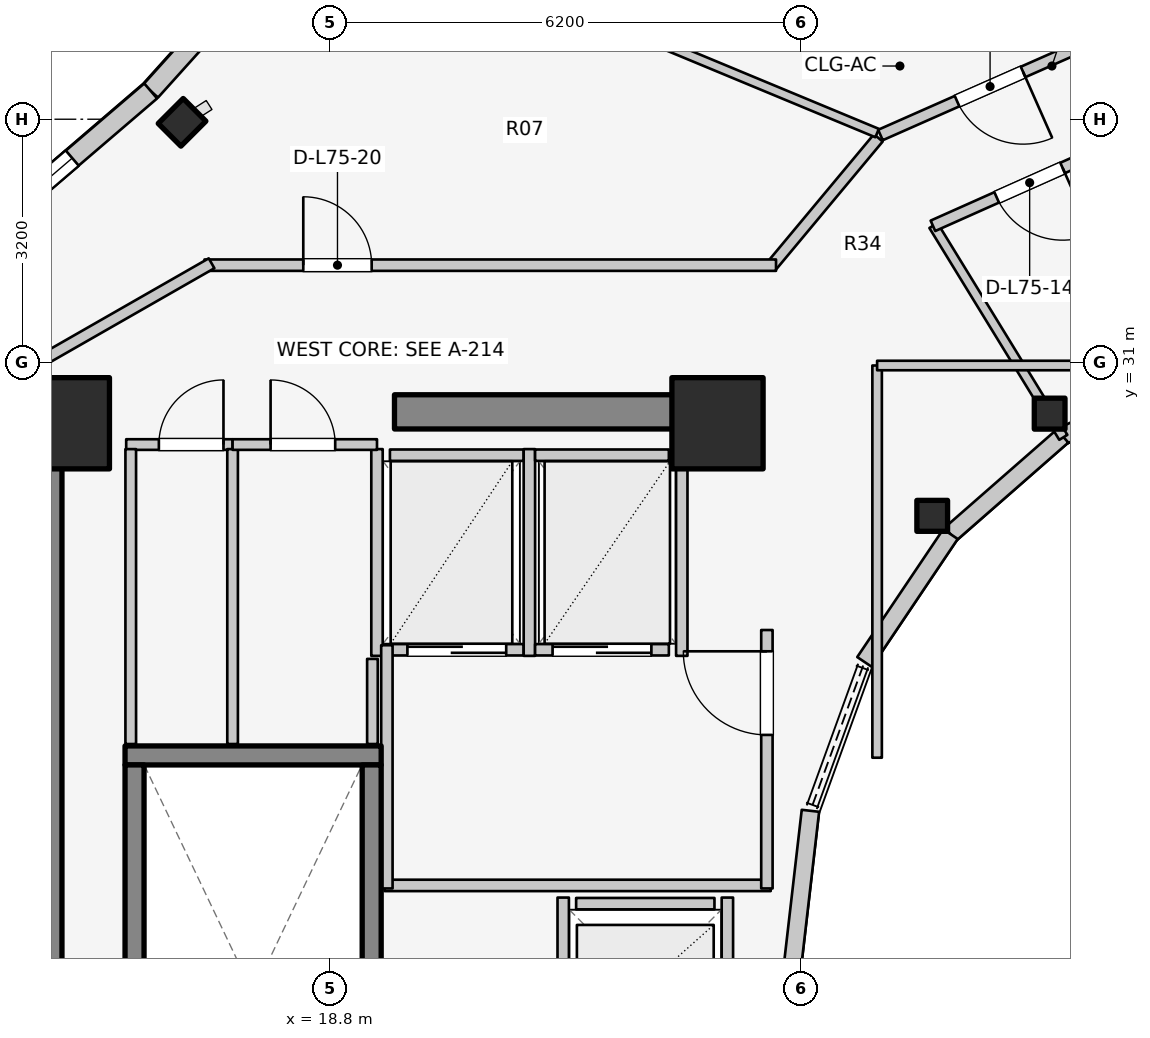
"""IFC4 building model, lengths in metres.
Left out: names, types, materials, properties, quantities, classifications, styles, units other than length and angle.
Written with IfcOpenShell. Run it as: python <this file> out.ifc"""

import sys

from ifc_helpers import new_model, si_unit, direction, frame, frame_2d, origin, origin_2d, place, context, subcontext, project, spatial, rectangle, i_section, extrude, element, fill, save


model = new_model("IFC4")
c1 = context("Model", 3, precision=1e-05, world=origin(), true_north=direction((0.0, 1.0)))
c2 = subcontext(c1, "Body", "Model", "MODEL_VIEW")
j1 = project(units=[si_unit("LENGTHUNIT", "METRE"), si_unit("PLANEANGLEUNIT", "RADIAN")], contexts=[c1])
p1 = place(None, origin())
s1 = spatial("IfcSite", under=j1, at=p1, CompositionType="ELEMENT")
p2 = place(p1, origin())
s2 = spatial("IfcBuilding", under=s1, at=p2, CompositionType="ELEMENT")
p3 = place(p2, frame((0.0, 0.0, 246.0)))
s3 = spatial("IfcBuildingStorey", under=s2, at=p3, CompositionType="ELEMENT", Elevation=246.0)
p4 = place(p3, frame((15.05, 17.05, 0.0), z_axis=(0.0, 0.0, 1.0), x_axis=(0.0, 1.0, 0.0)))
e1 = element("IfcWall", 1, at=p4, inside=s3, PredefinedType="SHEAR", context=c2, shape_type="SweptSolid", body=[
    extrude(rectangle(XDim=12.8, YDim=0.45, at=frame_2d((6.4, 0.0))), origin(), (0.0, 0.0, 1.0), 3.6),
])
p5 = place(p3, frame((19.65, 30.35, 0.0), z_axis=(0.0, 0.0, 1.0), x_axis=(1.0, 0.0, 0.0)))
e2 = element("IfcWall", 2, at=p5, inside=s3, PredefinedType="SHEAR", context=c2, shape_type="SweptSolid", body=[
    extrude(rectangle(XDim=4.5, YDim=0.45, at=frame_2d((2.25, 0.0))), origin(), (0.0, 0.0, 1.0), 3.6),
])
p6 = place(p3, frame((16.105, 25.83, 0.0), z_axis=(0.0, 0.0, 1.0), x_axis=(1.0, 0.0, 0.0)))
e3 = element("IfcWall", 3, at=p6, inside=s3, PredefinedType="SOLIDWALL", context=c2, shape_type="SweptSolid", body=[
    extrude(rectangle(XDim=3.37, YDim=0.25, at=frame_2d((1.685, 0.0))), origin(), (0.0, 0.0, 1.0), 3.6),
])
for number, where, z_axis, x_axis in (
    (4, (16.23, 17.895, 0.0), (0.0, 0.0, 1.0), (0.0, 1.0, 0.0)),
    (5, (19.35, 17.895, 0.0), (0.0, 0.0, 1.0), (0.0, 1.0, 0.0)),
):
    element("IfcWall", number, at=place(p3, frame(where, z_axis=z_axis, x_axis=x_axis)), inside=s3, PredefinedType="SOLIDWALL", context=c2, shape_type="SweptSolid", body=[
        extrude(rectangle(XDim=7.81, YDim=0.25, at=frame_2d((3.905, 0.0))), origin(), (0.0, 0.0, 1.0), 3.6),
    ])
for number, where, z_axis, x_axis in (
    (6, (23.9, 30.2, 0.0), (0.0, 0.0, 1.0), (1.0, 0.0, 0.0)),
    (7, (15.3, 30.2, 0.0), (0.0, 0.0, 1.0), (1.0, 0.0, 0.0)),
):
    element("IfcColumn", number, at=place(p3, frame(where, z_axis=z_axis, x_axis=x_axis)), inside=s3, PredefinedType="COLUMN", context=c2, shape_type="SweptSolid", body=[
        extrude(rectangle(XDim=1.2, YDim=1.2, at=origin_2d()), origin(), (0.0, 0.0, 1.0), 3.6),
    ])
for number, where, z_axis, x_axis in (
    (8, (28.27, 30.327, 0.0), (0.0, 0.0, 1.0), (1.0, 0.0, 0.0)),
    (9, (26.725, 28.982, 0.0), (0.0, 0.0, 1.0), (1.0, 0.0, 0.0)),
):
    element("IfcColumn", number, at=place(p3, frame(where, z_axis=z_axis, x_axis=x_axis)), inside=s3, PredefinedType="COLUMN", context=c2, shape_type="SweptSolid", body=[
        extrude(i_section(OverallWidth=0.404, OverallDepth=0.407, WebThickness=0.027, FlangeThickness=0.044, FilletRadius=0.025, at=origin_2d()), origin(), (0.0, 0.0, 1.0), 3.6),
    ])
p7 = place(p3, frame((16.855, 34.159, 0.0), z_axis=(0.0, 0.0, 1.0), x_axis=(-0.707106781187, 0.707106781187, 0.0)))
e10 = element("IfcColumn", 10, at=p7, inside=s3, PredefinedType="COLUMN", context=c2, shape_type="SweptSolid", body=[
    extrude(i_section(OverallWidth=0.422, OverallDepth=0.465, WebThickness=0.045, FlangeThickness=0.073, FilletRadius=0.025, at=origin_2d()), origin(), (0.0, 0.0, 1.0), 3.6),
])
p8 = place(p3, frame((30.157, 30.843, 0.0), z_axis=(0.0, 0.0, 1.0), x_axis=(-0.904179699603, -0.427152280606, 0.0)))
e11 = element("IfcWall", 11, at=p8, inside=s3, PredefinedType="STANDARD", context=c2, shape_type="SweptSolid", body=[
    extrude(rectangle(XDim=1.899, YDim=0.23, at=frame_2d((0.95, 0.0))), origin(), (0.0, 0.0, 1.0), 2.6),
])
p9 = place(p3, frame((28.44, 30.032, 0.0), z_axis=(0.0, 0.0, 1.0), x_axis=(-0.752576694707, -0.658504607869, 0.0)))
e12 = element("IfcWall", 12, at=p9, inside=s3, PredefinedType="STANDARD", context=c2, shape_type="SweptSolid", body=[
    extrude(rectangle(XDim=1.959, YDim=0.23, at=frame_2d((0.98, 0.0))), origin(), (0.0, 0.0, 1.0), 2.6),
])
p10 = place(p3, frame((26.965, 28.742, 0.0), z_axis=(0.0, 0.0, 1.0), x_axis=(-0.558197800898, -0.829707909492, 0.0)))
e13 = element("IfcWall", 13, at=p10, inside=s3, PredefinedType="STANDARD", context=c2, shape_type="SweptSolid", body=[
    extrude(rectangle(XDim=2.027, YDim=0.23, at=frame_2d((1.013, 0.0))), origin(), (0.0, 0.0, 1.0), 2.6),
])
p11 = place(p3, frame((25.123, 25.102, 0.0), z_axis=(0.0, 0.0, 1.0), x_axis=(-0.114711713601, -0.993398823617, 0.0)))
e14 = element("IfcWall", 14, at=p11, inside=s3, PredefinedType="STANDARD", context=c2, shape_type="SweptSolid", body=[
    extrude(rectangle(XDim=2.115, YDim=0.23, at=frame_2d((1.058, 0.0))), origin(), (0.0, 0.0, 1.0), 3.28),
])
p12 = place(p3, frame((20.13, 38.67, 0.0), z_axis=(0.0, 0.0, 1.0), x_axis=(-0.668903560134, -0.743349196031, 0.0)))
e15 = element("IfcWall", 15, at=p12, inside=s3, PredefinedType="STANDARD", context=c2, shape_type="SweptSolid", body=[
    extrude(rectangle(XDim=5.513, YDim=0.26, at=frame_2d((2.756, 0.0))), origin(), (0.0, 0.0, 1.0), 3.29),
])
p13 = place(p3, frame((16.442, 34.572, 0.0), z_axis=(0.0, 0.0, 1.0), x_axis=(-0.759587504333, -0.650405122413, 0.0)))
e16 = element("IfcWall", 16, at=p13, inside=s3, PredefinedType="STANDARD", context=c2, shape_type="SweptSolid", body=[
    extrude(rectangle(XDim=4.217, YDim=0.26, at=frame_2d((2.109, 0.0))), origin(), (0.0, 0.0, 1.0), 3.29),
])
p14 = place(p13, frame((1.359, 0.0, 0.75)))
e17 = element("IfcOpeningElement", 17, at=p14, cuts=e16, PredefinedType="OPENING", context=c2, shape_type="SweptSolid", body=[
    extrude(rectangle(XDim=1.5, YDim=1.6, at=frame_2d((0.75, 0.8))), frame((0.0, 0.14, 0.0), z_axis=(0.0, -1.0, 0.0), x_axis=(1.0, 0.0, 0.0)), (0.0, 0.0, 1.0), 0.28),
])
p15 = place(p3, frame((22.04, 23.88, 0.0), z_axis=(0.0, 0.0, 1.0), x_axis=(1.0, 0.0, 0.0)))
e18 = element("IfcWall", 18, at=p15, inside=s3, PredefinedType="SOLIDWALL", context=c2, shape_type="SweptSolid", body=[
    extrude(rectangle(XDim=1.82, YDim=0.15, at=frame_2d((0.91, 0.0))), origin(), (0.0, 0.0, 1.0), 2.62),
])
p16 = place(p3, frame((21.87, 21.64, 0.0), z_axis=(0.0, 0.0, 1.0), x_axis=(0.0, 1.0, 0.0)))
e19 = element("IfcWall", 19, at=p16, inside=s3, PredefinedType="SOLIDWALL", context=c2, shape_type="SweptSolid", body=[
    extrude(rectangle(XDim=2.32, YDim=0.15, at=frame_2d((1.16, 0.0))), origin(), (0.0, 0.0, 1.0), 3.295),
])
p17 = place(p3, frame((24.03, 21.64, 0.0), z_axis=(0.0, 0.0, 1.0), x_axis=(0.0, 1.0, 0.0)))
e20 = element("IfcWall", 20, at=p17, inside=s3, PredefinedType="SOLIDWALL", context=c2, shape_type="SweptSolid", body=[
    extrude(rectangle(XDim=2.32, YDim=0.15, at=frame_2d((1.16, 0.0))), origin(), (0.0, 0.0, 1.0), 2.62),
])
p18 = place(p3, frame((19.59, 27.22, 0.0), z_axis=(0.0, 0.0, 1.0), x_axis=(1.0, 0.0, 0.0)))
e21 = element("IfcWall", 21, at=p18, inside=s3, PredefinedType="SOLIDWALL", context=c2, shape_type="SweptSolid", body=[
    extrude(rectangle(XDim=1.76, YDim=0.15, at=frame_2d((0.88, 0.0))), origin(), (0.0, 0.0, 1.0), 3.295),
])
p19 = place(p18, frame((0.23, 0.0, 0.0)))
e22 = element("IfcOpeningElement", 22, at=p19, cuts=e21, PredefinedType="OPENING", context=c2, shape_type="SweptSolid", body=[
    extrude(rectangle(XDim=1.3, YDim=2.1, at=frame_2d((0.65, 1.05))), frame((0.0, 0.085, 0.0), z_axis=(0.0, -1.0, 0.0), x_axis=(1.0, 0.0, 0.0)), (0.0, 0.0, 1.0), 0.17),
])
p20 = place(p3, frame((19.59, 29.78, 0.0), z_axis=(0.0, 0.0, 1.0), x_axis=(1.0, 0.0, 0.0)))
e23 = element("IfcWall", 23, at=p20, inside=s3, PredefinedType="SOLIDWALL", context=c2, shape_type="SweptSolid", body=[
    extrude(rectangle(XDim=1.76, YDim=0.15, at=frame_2d((0.88, 0.0))), origin(), (0.0, 0.0, 1.0), 3.295),
])
for number, where, z_axis, x_axis in (
    (24, (19.42, 27.14, 0.0), (0.0, 0.0, 1.0), (0.0, 1.0, 0.0)),
    (25, (21.425, 27.14, 0.0), (0.0, 0.0, 1.0), (0.0, 1.0, 0.0)),
):
    element("IfcWall", number, at=place(p3, frame(where, z_axis=z_axis, x_axis=x_axis)), inside=s3, PredefinedType="SOLIDWALL", context=c2, shape_type="SweptSolid", body=[
        extrude(rectangle(XDim=2.72, YDim=0.15, at=frame_2d((1.36, 0.0))), origin(), (0.0, 0.0, 1.0), 3.295),
    ])
p21 = place(p3, frame((21.5, 27.22, 0.0), z_axis=(0.0, 0.0, 1.0), x_axis=(1.0, 0.0, 0.0)))
e26 = element("IfcWall", 26, at=p21, inside=s3, PredefinedType="SOLIDWALL", context=c2, shape_type="SweptSolid", body=[
    extrude(rectangle(XDim=1.76, YDim=0.15, at=frame_2d((0.88, 0.0))), origin(), (0.0, 0.0, 1.0), 3.295),
])
p22 = place(p21, frame((0.23, 0.0, 0.0)))
e27 = element("IfcOpeningElement", 27, at=p22, cuts=e26, PredefinedType="OPENING", context=c2, shape_type="SweptSolid", body=[
    extrude(rectangle(XDim=1.3, YDim=2.1, at=frame_2d((0.65, 1.05))), frame((0.0, 0.085, 0.0), z_axis=(0.0, -1.0, 0.0), x_axis=(1.0, 0.0, 0.0)), (0.0, 0.0, 1.0), 0.17),
])
p23 = place(p3, frame((21.5, 29.78, 0.0), z_axis=(0.0, 0.0, 1.0), x_axis=(1.0, 0.0, 0.0)))
e28 = element("IfcWall", 28, at=p23, inside=s3, PredefinedType="SOLIDWALL", context=c2, shape_type="SweptSolid", body=[
    extrude(rectangle(XDim=1.76, YDim=0.15, at=frame_2d((0.88, 0.0))), origin(), (0.0, 0.0, 1.0), 3.295),
])
p24 = place(p3, frame((23.43, 27.14, 0.0), z_axis=(0.0, 0.0, 1.0), x_axis=(0.0, 1.0, 0.0)))
e29 = element("IfcWall", 29, at=p24, inside=s3, PredefinedType="SOLIDWALL", context=c2, shape_type="SweptSolid", body=[
    extrude(rectangle(XDim=2.72, YDim=0.15, at=frame_2d((1.36, 0.0))), origin(), (0.0, 0.0, 1.0), 3.295),
])
p25 = place(p3, frame((19.52, 24.12, 0.0), z_axis=(0.0, 0.0, 1.0), x_axis=(1.0, 0.0, 0.0)))
e30 = element("IfcWall", 30, at=p25, inside=s3, PredefinedType="PARTITIONING", context=c2, shape_type="SweptSolid", body=[
    extrude(rectangle(XDim=5.08, YDim=0.15, at=frame_2d((2.54, 0.0))), origin(), (0.0, 0.0, 1.0), 2.62),
])
p26 = place(p3, frame((19.55, 24.08, 0.0), z_axis=(0.0, 0.0, 1.0), x_axis=(0.0, 1.0, 0.0)))
e31 = element("IfcWall", 31, at=p26, inside=s3, PredefinedType="PARTITIONING", context=c2, shape_type="SweptSolid", body=[
    extrude(rectangle(XDim=3.2, YDim=0.15, at=frame_2d((1.6, 0.0))), origin(), (0.0, 0.0, 1.0), 3.295),
])
p27 = place(p3, frame((24.55, 24.08, 0.0), z_axis=(0.0, 0.0, 1.0), x_axis=(0.0, 1.0, 0.0)))
e32 = element("IfcWall", 32, at=p27, inside=s3, PredefinedType="PARTITIONING", context=c2, shape_type="SweptSolid", body=[
    extrude(rectangle(XDim=3.4, YDim=0.15, at=frame_2d((1.7, 0.0))), origin(), (0.0, 0.0, 1.0), 3.295),
])
p28 = place(p27, frame((2.02, 0.0, 0.0)))
e33 = element("IfcOpeningElement", 33, at=p28, cuts=e32, PredefinedType="OPENING", context=c2, shape_type="SweptSolid", body=[
    extrude(rectangle(XDim=1.1, YDim=2.1, at=frame_2d((0.55, 1.05))), frame((0.0, 0.085, 0.0), z_axis=(0.0, -1.0, 0.0), x_axis=(1.0, 0.0, 0.0)), (0.0, 0.0, 1.0), 0.17),
])
p29 = place(p3, frame((16.12, 29.92, 0.0), z_axis=(0.0, 0.0, 1.0), x_axis=(1.0, 0.0, 0.0)))
e34 = element("IfcWall", 34, at=p29, inside=s3, PredefinedType="PLUMBINGWALL", context=c2, shape_type="SweptSolid", body=[
    extrude(rectangle(XDim=1.4, YDim=0.14, at=frame_2d((0.7, 0.0))), origin(), (0.0, 0.0, 1.0), 3.295),
])
p30 = place(p29, frame((0.43, 0.0, 0.0)))
e35 = element("IfcOpeningElement", 35, at=p30, cuts=e34, PredefinedType="OPENING", context=c2, shape_type="SweptSolid", body=[
    extrude(rectangle(XDim=0.85, YDim=2.05, at=frame_2d((0.425, 1.025))), frame((0.0, 0.08, 0.0), z_axis=(0.0, -1.0, 0.0), x_axis=(1.0, 0.0, 0.0)), (0.0, 0.0, 1.0), 0.16),
])
for number, where, z_axis, x_axis in (
    (36, (16.18, 25.98, 0.0), (0.0, 0.0, 1.0), (0.0, 1.0, 0.0)),
    (37, (17.52, 25.98, 0.0), (0.0, 0.0, 1.0), (0.0, 1.0, 0.0)),
):
    element("IfcWall", number, at=place(p3, frame(where, z_axis=z_axis, x_axis=x_axis)), inside=s3, PredefinedType="PLUMBINGWALL", context=c2, shape_type="SweptSolid", body=[
        extrude(rectangle(XDim=3.88, YDim=0.14, at=frame_2d((1.94, 0.0))), origin(), (0.0, 0.0, 1.0), 3.295),
    ])
p31 = place(p3, frame((17.52, 29.92, 0.0), z_axis=(0.0, 0.0, 1.0), x_axis=(1.0, 0.0, 0.0)))
e38 = element("IfcWall", 38, at=p31, inside=s3, PredefinedType="PLUMBINGWALL", context=c2, shape_type="SweptSolid", body=[
    extrude(rectangle(XDim=1.9, YDim=0.14, at=frame_2d((0.95, 0.0))), origin(), (0.0, 0.0, 1.0), 3.295),
])
p32 = place(p31, frame((0.5, 0.0, 0.0)))
e39 = element("IfcOpeningElement", 39, at=p32, cuts=e38, PredefinedType="OPENING", context=c2, shape_type="SweptSolid", body=[
    extrude(rectangle(XDim=0.85, YDim=2.05, at=frame_2d((0.425, 1.025))), frame((0.0, 0.08, 0.0), z_axis=(0.0, -1.0, 0.0), x_axis=(1.0, 0.0, 0.0)), (0.0, 0.0, 1.0), 0.16),
])
p33 = place(p3, frame((19.36, 25.98, 0.0), z_axis=(0.0, 0.0, 1.0), x_axis=(0.0, 1.0, 0.0)))
e40 = element("IfcWall", 40, at=p33, inside=s3, PredefinedType="PLUMBINGWALL", context=c2, shape_type="SweptSolid", body=[
    extrude(rectangle(XDim=1.12, YDim=0.14, at=frame_2d((0.56, 0.0))), origin(), (0.0, 0.0, 1.0), 3.295),
])
p34 = place(p3, frame((28.45, 30.015, 0.0), z_axis=(0.0, 0.0, 1.0), x_axis=(-0.522763432117, 0.852477796802, 0.0)))
e41 = element("IfcWall", 41, at=p34, inside=s3, PredefinedType="PARTITIONING", context=c2, shape_type="SweptSolid", body=[
    extrude(rectangle(XDim=3.269, YDim=0.125, at=frame_2d((1.635, 0.0))), origin(), (0.0, 0.0, 1.0), 2.672),
])
p35 = place(p3, frame((29.28, 33.933, 0.0), z_axis=(0.0, 0.0, 1.0), x_axis=(-0.913254317828, -0.407389924971, 0.0)))
e42 = element("IfcWall", 42, at=p35, inside=s3, PredefinedType="PARTITIONING", context=c2, shape_type="SweptSolid", body=[
    extrude(rectangle(XDim=2.787, YDim=0.15, at=frame_2d((1.393, 0.0))), origin(), (0.0, 0.0, 1.0), 2.823),
])
p36 = place(p35, frame((0.918, 0.0, 0.0)))
e43 = element("IfcOpeningElement", 43, at=p36, cuts=e42, PredefinedType="OPENING", context=c2, shape_type="SweptSolid", body=[
    extrude(rectangle(XDim=0.95, YDim=2.1, at=frame_2d((0.475, 1.05))), frame((0.0, 0.085, 0.0), z_axis=(0.0, -1.0, 0.0), x_axis=(1.0, 0.0, 0.0)), (0.0, 0.0, 1.0), 0.17),
])
p37 = place(p3, frame((26.0, 25.8, 0.0), z_axis=(0.0, 0.0, 1.0), x_axis=(0.0, 1.0, 0.0)))
e44 = element("IfcWall", 44, at=p37, inside=s3, PredefinedType="PARTITIONING", context=c2, shape_type="SweptSolid", body=[
    extrude(rectangle(XDim=5.16, YDim=0.125, at=frame_2d((2.58, 0.0))), origin(), (0.0, 0.0, 1.0), 2.672),
])
p38 = place(p3, frame((26.0, 30.96, 0.0), z_axis=(0.0, 0.0, 1.0), x_axis=(1.0, 0.0, 0.0)))
e45 = element("IfcWall", 45, at=p38, inside=s3, PredefinedType="PARTITIONING", context=c2, shape_type="SweptSolid", body=[
    extrude(rectangle(XDim=2.6, YDim=0.125, at=frame_2d((1.3, 0.0))), origin(), (0.0, 0.0, 1.0), 2.816),
])
p39 = place(p3, frame((26.016, 33.955, 0.0), z_axis=(0.0, 0.0, 1.0), x_axis=(-0.64030392053, -0.76812166312, 0.0)))
e46 = element("IfcWall", 46, at=p39, inside=s3, PredefinedType="PARTITIONING", context=c2, shape_type="SweptSolid", body=[
    extrude(rectangle(XDim=2.21, YDim=0.15, at=frame_2d((1.105, 0.0))), origin(), (0.0, 0.0, 1.0), 2.816),
])
p40 = place(p3, frame((17.15, 32.28, 0.0), z_axis=(0.0, 0.0, 1.0), x_axis=(1.0, 0.0, 0.0)))
e47 = element("IfcWall", 47, at=p40, inside=s3, PredefinedType="PARTITIONING", context=c2, shape_type="SweptSolid", body=[
    extrude(rectangle(XDim=7.52, YDim=0.15, at=frame_2d((3.76, 0.0))), origin(), (0.0, 0.0, 1.0), 2.816),
])
p41 = place(p40, frame((1.3, 0.0, 0.0)))
e48 = element("IfcOpeningElement", 48, at=p41, cuts=e47, PredefinedType="OPENING", context=c2, shape_type="SweptSolid", body=[
    extrude(rectangle(XDim=0.9, YDim=2.1, at=frame_2d((0.45, 1.05))), frame((0.0, 0.085, 0.0), z_axis=(0.0, -1.0, 0.0), x_axis=(1.0, 0.0, 0.0)), (0.0, 0.0, 1.0), 0.17),
])
p42 = place(p3, frame((17.243, 32.305, 0.0), z_axis=(0.0, 0.0, 1.0), x_axis=(-0.867991349648, -0.496579315857, 0.0)))
e49 = element("IfcWall", 49, at=p42, inside=s3, PredefinedType="PARTITIONING", context=c2, shape_type="SweptSolid", body=[
    extrude(rectangle(XDim=2.567, YDim=0.15, at=frame_2d((1.283, 0.0))), origin(), (0.0, 0.0, 1.0), 2.66),
])
p43 = place(p3, frame((26.0, 34.018, 0.0), z_axis=(0.0, 0.0, 1.0), x_axis=(-0.92349333748, 0.383614462228, 0.0)))
e50 = element("IfcWall", 50, at=p43, inside=s3, PredefinedType="MOVABLE", context=c2, shape_type="SweptSolid", body=[
    extrude(rectangle(XDim=5.907, YDim=0.12, at=frame_2d((2.954, 0.0))), origin(), (0.0, 0.0, 1.0), 2.66),
])
p44 = place(p3, frame((28.929, 35.268, 0.0), z_axis=(0.0, 0.0, 1.0), x_axis=(-0.914642679993, -0.404263240891, 0.0)))
e51 = element("IfcWall", 51, at=p44, inside=s3, PredefinedType="PARTITIONING", context=c2, shape_type="SweptSolid", body=[
    extrude(rectangle(XDim=3.154, YDim=0.15, at=frame_2d((1.577, 0.0))), origin(), (0.0, 0.0, 1.0), 2.823),
])
p45 = place(p44, frame((1.102, 0.0, 0.0)))
e52 = element("IfcOpeningElement", 52, at=p45, cuts=e51, PredefinedType="OPENING", context=c2, shape_type="SweptSolid", body=[
    extrude(rectangle(XDim=0.95, YDim=2.1, at=frame_2d((0.475, 1.05))), frame((0.0, 0.085, 0.0), z_axis=(0.0, -1.0, 0.0), x_axis=(1.0, 0.0, 0.0)), (0.0, 0.0, 1.0), 0.17),
])
p46 = place(p14, origin())
e53 = element("IfcWindow", 53, at=p46, inside=s3, PartitioningType="SINGLE_PANEL", PredefinedType="WINDOW", context=c2, shape_type="SweptSolid", body=[
    extrude(rectangle(XDim=1.5, YDim=1.6, at=frame_2d((0.75, 0.8))), frame((0.0, 0.03, 0.0), z_axis=(0.0, -1.0, 0.0), x_axis=(1.0, 0.0, 0.0)), (0.0, 0.0, 1.0), 0.06),
])
fill(e17, e53)
p47 = place(p19, origin())
e54 = element("IfcDoor", 54, at=p47, inside=s3, OperationType="DOUBLE_DOOR_SLIDING", PredefinedType="DOOR", context=c2, shape_type="SweptSolid", body=[
    extrude(rectangle(XDim=1.3, YDim=2.1, at=frame_2d((0.65, 1.05))), frame((0.0, 0.025, 0.0), z_axis=(0.0, -1.0, 0.0), x_axis=(1.0, 0.0, 0.0)), (0.0, 0.0, 1.0), 0.05),
])
fill(e22, e54)
p48 = place(p22, origin())
e55 = element("IfcDoor", 55, at=p48, inside=s3, OperationType="DOUBLE_DOOR_SLIDING", PredefinedType="DOOR", context=c2, shape_type="SweptSolid", body=[
    extrude(rectangle(XDim=1.3, YDim=2.1, at=frame_2d((0.65, 1.05))), frame((0.0, 0.025, 0.0), z_axis=(0.0, -1.0, 0.0), x_axis=(1.0, 0.0, 0.0)), (0.0, 0.0, 1.0), 0.05),
])
fill(e27, e55)
p49 = place(p28, origin())
e56 = element("IfcDoor", 56, at=p49, inside=s3, OperationType="SINGLE_SWING_RIGHT", PredefinedType="DOOR", context=c2, shape_type="SweptSolid", body=[
    extrude(rectangle(XDim=1.1, YDim=2.1, at=frame_2d((0.55, 1.05))), frame((0.0, 0.025, 0.0), z_axis=(0.0, -1.0, 0.0), x_axis=(1.0, 0.0, 0.0)), (0.0, 0.0, 1.0), 0.05),
])
fill(e33, e56)
p50 = place(p30, origin())
e57 = element("IfcDoor", 57, at=p50, inside=s3, OperationType="SINGLE_SWING_RIGHT", PredefinedType="DOOR", context=c2, shape_type="SweptSolid", body=[
    extrude(rectangle(XDim=0.85, YDim=2.05, at=frame_2d((0.425, 1.025))), frame((0.0, 0.025, 0.0), z_axis=(0.0, -1.0, 0.0), x_axis=(1.0, 0.0, 0.0)), (0.0, 0.0, 1.0), 0.05),
])
fill(e35, e57)
p51 = place(p32, origin())
e58 = element("IfcDoor", 58, at=p51, inside=s3, OperationType="SINGLE_SWING_LEFT", PredefinedType="DOOR", context=c2, shape_type="SweptSolid", body=[
    extrude(rectangle(XDim=0.85, YDim=2.05, at=frame_2d((0.425, 1.025))), frame((0.0, 0.025, 0.0), z_axis=(0.0, -1.0, 0.0), x_axis=(1.0, 0.0, 0.0)), (0.0, 0.0, 1.0), 0.05),
])
fill(e39, e58)
p52 = place(p36, origin())
e59 = element("IfcDoor", 59, at=p52, inside=s3, OperationType="SINGLE_SWING_LEFT", PredefinedType="DOOR", context=c2, shape_type="SweptSolid", body=[
    extrude(rectangle(XDim=0.95, YDim=2.1, at=frame_2d((0.475, 1.05))), frame((0.0, 0.025, 0.0), z_axis=(0.0, -1.0, 0.0), x_axis=(1.0, 0.0, 0.0)), (0.0, 0.0, 1.0), 0.05),
])
fill(e43, e59)
p53 = place(p41, origin())
e60 = element("IfcDoor", 60, at=p53, inside=s3, OperationType="SINGLE_SWING_LEFT", PredefinedType="DOOR", context=c2, shape_type="SweptSolid", body=[
    extrude(rectangle(XDim=0.9, YDim=2.1, at=frame_2d((0.45, 1.05))), frame((0.0, 0.025, 0.0), z_axis=(0.0, -1.0, 0.0), x_axis=(1.0, 0.0, 0.0)), (0.0, 0.0, 1.0), 0.05),
])
fill(e48, e60)
p54 = place(p45, origin())
e61 = element("IfcDoor", 61, at=p54, inside=s3, OperationType="SINGLE_SWING_LEFT", PredefinedType="DOOR", context=c2, shape_type="SweptSolid", body=[
    extrude(rectangle(XDim=0.95, YDim=2.1, at=frame_2d((0.475, 1.05))), frame((0.0, 0.025, 0.0), z_axis=(0.0, -1.0, 0.0), x_axis=(1.0, 0.0, 0.0)), (0.0, 0.0, 1.0), 0.05),
])
fill(e52, e61)
save(model, sys.argv[1])
